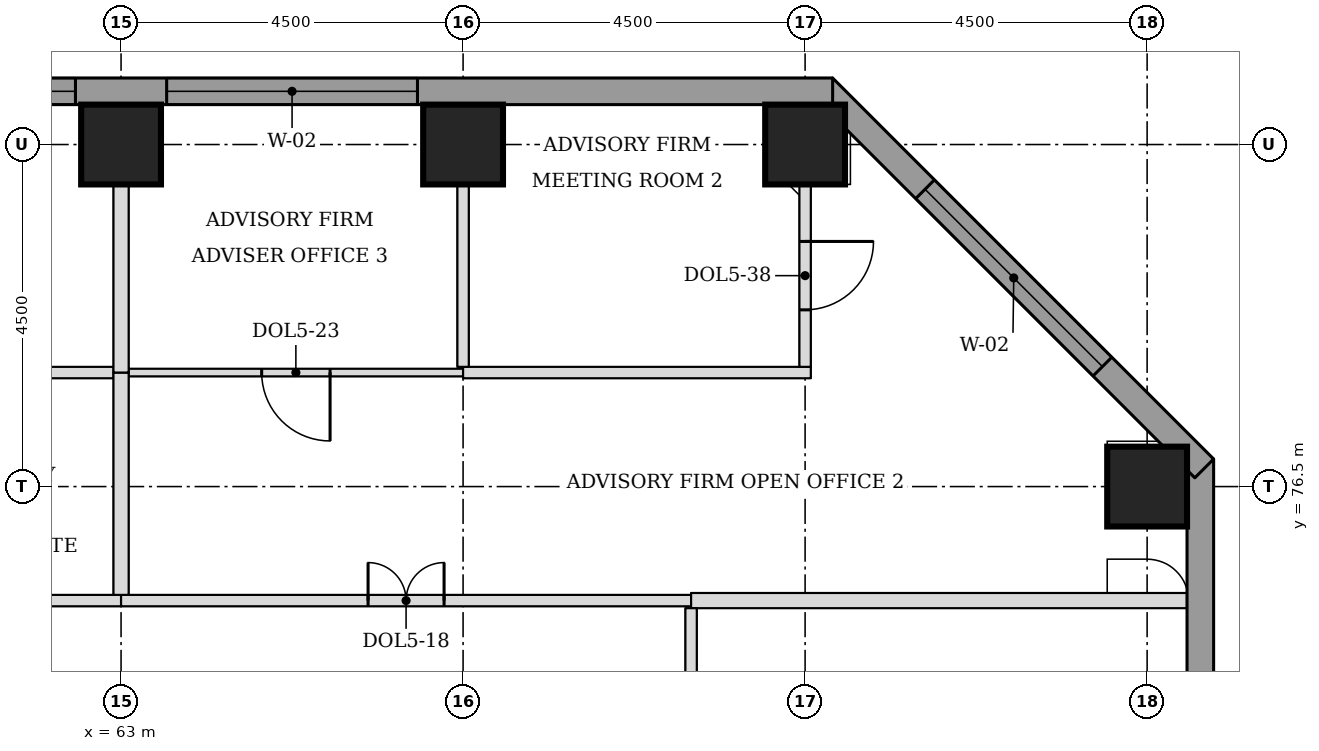
"""IFC4 building model, lengths in metres.
Left out: names, types, materials, properties, quantities, classifications, styles, units other than length and angle.
Written with IfcOpenShell. Run it as: python <this file> out.ifc"""

import sys

from ifc_helpers import new_model, si_unit, direction, frame, frame_2d, origin, origin_2d, place, context, subcontext, project, spatial, rectangle, extrude, element, fill, save


model = new_model("IFC4")
c1 = context("Model", 3, precision=1e-05, world=origin(), true_north=direction((0.0, 1.0)))
c2 = subcontext(c1, "Body", "Model", "MODEL_VIEW")
j1 = project(units=[si_unit("LENGTHUNIT", "METRE"), si_unit("PLANEANGLEUNIT", "RADIAN")], contexts=[c1])
p1 = place(None, origin())
s1 = spatial("IfcSite", under=j1, at=p1, CompositionType="ELEMENT")
p2 = place(p1, origin())
s2 = spatial("IfcBuilding", under=s1, at=p2, CompositionType="ELEMENT")
p3 = place(p2, frame((0.0, 0.0, 112.2)))
s3 = spatial("IfcBuildingStorey", under=s2, at=p3, CompositionType="ELEMENT", Elevation=112.2)
for number, where, z_axis, x_axis in (
    (1, (76.5, 76.5, 0.0), (0.0, 0.0, 1.0), (1.0, 0.0, 0.0)),
    (2, (63.0, 81.0, 0.0), (0.0, 0.0, 1.0), (1.0, 0.0, 0.0)),
    (3, (67.5, 81.0, 0.0), (0.0, 0.0, 1.0), (1.0, 0.0, 0.0)),
    (4, (72.0, 81.0, 0.0), (0.0, 0.0, 1.0), (1.0, 0.0, 0.0)),
):
    element("IfcColumn", number, at=place(p3, frame(where, z_axis=z_axis, x_axis=x_axis)), inside=s3, PredefinedType="COLUMN", context=c2, shape_type="SweptSolid", body=[
        extrude(rectangle(XDim=1.05, YDim=1.05, at=origin_2d()), origin(), (0.0, 0.0, 1.0), 3.7),
    ])
p4 = place(p3, frame((77.2, 44.638, 0.0), z_axis=(0.0, 0.0, 1.0), x_axis=(0.0, 1.0, 0.0)))
e5 = element("IfcWall", 5, at=p4, inside=s3, PredefinedType="STANDARD", context=c2, shape_type="SweptSolid", body=[
    extrude(rectangle(XDim=32.225, YDim=0.35, at=frame_2d((16.112, 0.0))), origin(), (0.0, 0.0, 1.0), 3.525),
])
p5 = place(p4, frame((5.462, 0.0, 0.9)))
e6 = element("IfcOpeningElement", 6, at=p5, cuts=e5, PredefinedType="OPENING", context=c2, shape_type="SweptSolid", body=[
    extrude(rectangle(XDim=3.3, YDim=1.9, at=frame_2d((1.65, 0.95))), frame((0.0, 0.185, 0.0), z_axis=(0.0, -1.0, 0.0), x_axis=(1.0, 0.0, 0.0)), (0.0, 0.0, 1.0), 0.37),
])
p6 = place(p4, frame((9.962, 0.0, 0.9)))
e7 = element("IfcOpeningElement", 7, at=p6, cuts=e5, PredefinedType="OPENING", context=c2, shape_type="SweptSolid", body=[
    extrude(rectangle(XDim=3.3, YDim=1.9, at=frame_2d((1.65, 0.95))), frame((0.0, 0.185, 0.0), z_axis=(0.0, -1.0, 0.0), x_axis=(1.0, 0.0, 0.0)), (0.0, 0.0, 1.0), 0.37),
])
p7 = place(p4, frame((14.462, 0.0, 0.9)))
e8 = element("IfcOpeningElement", 8, at=p7, cuts=e5, PredefinedType="OPENING", context=c2, shape_type="SweptSolid", body=[
    extrude(rectangle(XDim=3.3, YDim=1.9, at=frame_2d((1.65, 0.95))), frame((0.0, 0.185, 0.0), z_axis=(0.0, -1.0, 0.0), x_axis=(1.0, 0.0, 0.0)), (0.0, 0.0, 1.0), 0.37),
])
p8 = place(p4, frame((18.962, 0.0, 0.9)))
e9 = element("IfcOpeningElement", 9, at=p8, cuts=e5, PredefinedType="OPENING", context=c2, shape_type="SweptSolid", body=[
    extrude(rectangle(XDim=3.3, YDim=1.9, at=frame_2d((1.65, 0.95))), frame((0.0, 0.185, 0.0), z_axis=(0.0, -1.0, 0.0), x_axis=(1.0, 0.0, 0.0)), (0.0, 0.0, 1.0), 0.37),
])
p9 = place(p4, frame((23.462, 0.0, 0.9)))
e10 = element("IfcOpeningElement", 10, at=p9, cuts=e5, PredefinedType="OPENING", context=c2, shape_type="SweptSolid", body=[
    extrude(rectangle(XDim=3.3, YDim=1.9, at=frame_2d((1.65, 0.95))), frame((0.0, 0.185, 0.0), z_axis=(0.0, -1.0, 0.0), x_axis=(1.0, 0.0, 0.0)), (0.0, 0.0, 1.0), 0.37),
])
p10 = place(p3, frame((77.251, 76.739, 0.0), z_axis=(0.0, 0.0, 1.0), x_axis=(-0.707106781187, 0.707106781187, 0.0)))
e11 = element("IfcWall", 11, at=p10, inside=s3, PredefinedType="STANDARD", context=c2, shape_type="SweptSolid", body=[
    extrude(rectangle(XDim=7.089, YDim=0.35, at=frame_2d((3.544, 0.0))), origin(), (0.0, 0.0, 1.0), 3.525),
])
p11 = place(p10, frame((1.894, 0.0, 0.9)))
e12 = element("IfcOpeningElement", 12, at=p11, cuts=e11, PredefinedType="OPENING", context=c2, shape_type="SweptSolid", body=[
    extrude(rectangle(XDim=3.3, YDim=1.9, at=frame_2d((1.65, 0.95))), frame((0.0, 0.185, 0.0), z_axis=(0.0, -1.0, 0.0), x_axis=(1.0, 0.0, 0.0)), (0.0, 0.0, 1.0), 0.37),
])
p12 = place(p3, frame((72.362, 81.7, 0.0), z_axis=(0.0, 0.0, 1.0), x_axis=(-1.0, 0.0, 0.0)))
e13 = element("IfcWall", 13, at=p12, inside=s3, PredefinedType="STANDARD", context=c2, shape_type="SweptSolid", body=[
    extrude(rectangle(XDim=32.225, YDim=0.35, at=frame_2d((16.112, 0.0))), origin(), (0.0, 0.0, 1.0), 3.525),
])
p13 = place(p12, frame((5.462, 0.0, 0.9)))
e14 = element("IfcOpeningElement", 14, at=p13, cuts=e13, PredefinedType="OPENING", context=c2, shape_type="SweptSolid", body=[
    extrude(rectangle(XDim=3.3, YDim=1.9, at=frame_2d((1.65, 0.95))), frame((0.0, 0.185, 0.0), z_axis=(0.0, -1.0, 0.0), x_axis=(1.0, 0.0, 0.0)), (0.0, 0.0, 1.0), 0.37),
])
p14 = place(p12, frame((9.962, 0.0, 0.9)))
e15 = element("IfcOpeningElement", 15, at=p14, cuts=e13, PredefinedType="OPENING", context=c2, shape_type="SweptSolid", body=[
    extrude(rectangle(XDim=3.3, YDim=1.9, at=frame_2d((1.65, 0.95))), frame((0.0, 0.185, 0.0), z_axis=(0.0, -1.0, 0.0), x_axis=(1.0, 0.0, 0.0)), (0.0, 0.0, 1.0), 0.37),
])
p15 = place(p12, frame((14.462, 0.0, 0.9)))
e16 = element("IfcOpeningElement", 16, at=p15, cuts=e13, PredefinedType="OPENING", context=c2, shape_type="SweptSolid", body=[
    extrude(rectangle(XDim=3.3, YDim=1.9, at=frame_2d((1.65, 0.95))), frame((0.0, 0.185, 0.0), z_axis=(0.0, -1.0, 0.0), x_axis=(1.0, 0.0, 0.0)), (0.0, 0.0, 1.0), 0.37),
])
p16 = place(p12, frame((18.962, 0.0, 0.9)))
e17 = element("IfcOpeningElement", 17, at=p16, cuts=e13, PredefinedType="OPENING", context=c2, shape_type="SweptSolid", body=[
    extrude(rectangle(XDim=3.3, YDim=1.9, at=frame_2d((1.65, 0.95))), frame((0.0, 0.185, 0.0), z_axis=(0.0, -1.0, 0.0), x_axis=(1.0, 0.0, 0.0)), (0.0, 0.0, 1.0), 0.37),
])
p17 = place(p12, frame((23.462, 0.0, 0.9)))
e18 = element("IfcOpeningElement", 18, at=p17, cuts=e13, PredefinedType="OPENING", context=c2, shape_type="SweptSolid", body=[
    extrude(rectangle(XDim=3.3, YDim=1.9, at=frame_2d((1.65, 0.95))), frame((0.0, 0.185, 0.0), z_axis=(0.0, -1.0, 0.0), x_axis=(1.0, 0.0, 0.0)), (0.0, 0.0, 1.0), 0.37),
])
p18 = place(p3, frame((60.0, 75.0, 0.0), z_axis=(0.0, 0.0, 1.0), x_axis=(1.0, 0.0, 0.0)))
e19 = element("IfcWall", 19, at=p18, inside=s3, PredefinedType="PARTITIONING", context=c2, shape_type="SweptSolid", body=[
    extrude(rectangle(XDim=3.0, YDim=0.15, at=frame_2d((1.5, 0.0))), origin(), (0.0, 0.0, 1.0), 3.55),
])
p19 = place(p3, frame((63.0, 75.0, 0.0), z_axis=(0.0, 0.0, 1.0), x_axis=(1.0, 0.0, 0.0)))
e20 = element("IfcWall", 20, at=p19, inside=s3, PredefinedType="PARTITIONING", context=c2, shape_type="SweptSolid", body=[
    extrude(rectangle(XDim=7.5, YDim=0.15, at=frame_2d((3.75, 0.0))), origin(), (0.0, 0.0, 1.0), 3.55),
])
p20 = place(p19, frame((3.25, 0.0, 0.0)))
e21 = element("IfcOpeningElement", 21, at=p20, cuts=e20, PredefinedType="OPENING", context=c2, shape_type="SweptSolid", body=[
    extrude(rectangle(XDim=1.0, YDim=2.1, at=frame_2d((0.5, 1.05))), frame((0.0, 0.085, 0.0), z_axis=(0.0, -1.0, 0.0), x_axis=(1.0, 0.0, 0.0)), (0.0, 0.0, 1.0), 0.17),
])
p21 = place(p3, frame((70.5, 75.0, 0.0), z_axis=(0.0, 0.0, 1.0), x_axis=(1.0, 0.0, 0.0)))
e22 = element("IfcWall", 22, at=p21, inside=s3, PredefinedType="PARTITIONING", context=c2, shape_type="SweptSolid", body=[
    extrude(rectangle(XDim=6.525, YDim=0.2, at=frame_2d((3.262, 0.0))), origin(), (0.0, 0.0, 1.0), 3.55),
])
p22 = place(p3, frame((59.925, 78.0, 0.0), z_axis=(0.0, 0.0, 1.0), x_axis=(1.0, 0.0, 0.0)))
e23 = element("IfcWall", 23, at=p22, inside=s3, PredefinedType="PARTITIONING", context=c2, shape_type="SweptSolid", body=[
    extrude(rectangle(XDim=2.975, YDim=0.15, at=frame_2d((1.487, 0.0))), origin(), (0.0, 0.0, 1.0), 3.55),
])
p23 = place(p22, frame((1.05, 0.0, 0.0)))
e24 = element("IfcOpeningElement", 24, at=p23, cuts=e23, PredefinedType="OPENING", context=c2, shape_type="SweptSolid", body=[
    extrude(rectangle(XDim=0.9, YDim=2.1, at=frame_2d((0.45, 1.05))), frame((0.0, 0.085, 0.0), z_axis=(0.0, -1.0, 0.0), x_axis=(1.0, 0.0, 0.0)), (0.0, 0.0, 1.0), 0.17),
])
p24 = place(p3, frame((63.1, 78.0, 0.0), z_axis=(0.0, 0.0, 1.0), x_axis=(1.0, 0.0, 0.0)))
e25 = element("IfcWall", 25, at=p24, inside=s3, PredefinedType="PARTITIONING", context=c2, shape_type="SweptSolid", body=[
    extrude(rectangle(XDim=4.4, YDim=0.1, at=frame_2d((2.2, 0.0))), origin(), (0.0, 0.0, 1.0), 3.55),
])
p25 = place(p24, frame((1.75, 0.0, 0.0)))
e26 = element("IfcOpeningElement", 26, at=p25, cuts=e25, PredefinedType="OPENING", context=c2, shape_type="SweptSolid", body=[
    extrude(rectangle(XDim=0.9, YDim=2.1, at=frame_2d((0.45, 1.05))), frame((0.0, 0.06, 0.0), z_axis=(0.0, -1.0, 0.0), x_axis=(1.0, 0.0, 0.0)), (0.0, 0.0, 1.0), 0.12),
])
p26 = place(p3, frame((67.5, 78.0, 0.0), z_axis=(0.0, 0.0, 1.0), x_axis=(1.0, 0.0, 0.0)))
e27 = element("IfcWall", 27, at=p26, inside=s3, PredefinedType="PARTITIONING", context=c2, shape_type="SweptSolid", body=[
    extrude(rectangle(XDim=4.575, YDim=0.15, at=frame_2d((2.288, 0.0))), origin(), (0.0, 0.0, 1.0), 3.55),
])
p27 = place(p3, frame((70.5, 57.0, 0.0), z_axis=(0.0, 0.0, 1.0), x_axis=(0.0, 1.0, 0.0)))
e28 = element("IfcWall", 28, at=p27, inside=s3, PredefinedType="PARTITIONING", context=c2, shape_type="SweptSolid", body=[
    extrude(rectangle(XDim=17.9, YDim=0.15, at=frame_2d((8.95, 0.0))), origin(), (0.0, 0.0, 1.0), 3.55),
])
p28 = place(p27, frame((8.45, 0.0, 0.0)))
e29 = element("IfcOpeningElement", 29, at=p28, cuts=e28, PredefinedType="OPENING", context=c2, shape_type="SweptSolid", body=[
    extrude(rectangle(XDim=1.0, YDim=2.1, at=frame_2d((0.5, 1.05))), frame((0.0, 0.085, 0.0), z_axis=(0.0, -1.0, 0.0), x_axis=(1.0, 0.0, 0.0)), (0.0, 0.0, 1.0), 0.17),
])
p29 = place(p3, frame((63.0, 75.075, 0.0), z_axis=(0.0, 0.0, 1.0), x_axis=(0.0, 1.0, 0.0)))
e30 = element("IfcWall", 30, at=p29, inside=s3, PredefinedType="PARTITIONING", context=c2, shape_type="SweptSolid", body=[
    extrude(rectangle(XDim=2.925, YDim=0.2, at=frame_2d((1.462, 0.0))), origin(), (0.0, 0.0, 1.0), 3.55),
])
p30 = place(p3, frame((63.0, 78.0, 0.0), z_axis=(0.0, 0.0, 1.0), x_axis=(0.0, 1.0, 0.0)))
e31 = element("IfcWall", 31, at=p30, inside=s3, PredefinedType="PARTITIONING", context=c2, shape_type="SweptSolid", body=[
    extrude(rectangle(XDim=3.525, YDim=0.2, at=frame_2d((1.762, 0.0))), origin(), (0.0, 0.0, 1.0), 3.55),
])
p31 = place(p3, frame((67.5, 78.075, 0.0), z_axis=(0.0, 0.0, 1.0), x_axis=(0.0, 1.0, 0.0)))
e32 = element("IfcWall", 32, at=p31, inside=s3, PredefinedType="PARTITIONING", context=c2, shape_type="SweptSolid", body=[
    extrude(rectangle(XDim=3.45, YDim=0.15, at=frame_2d((1.725, 0.0))), origin(), (0.0, 0.0, 1.0), 3.55),
])
p32 = place(p3, frame((72.0, 78.075, 0.0), z_axis=(0.0, 0.0, 1.0), x_axis=(0.0, 1.0, 0.0)))
e33 = element("IfcWall", 33, at=p32, inside=s3, PredefinedType="PARTITIONING", context=c2, shape_type="SweptSolid", body=[
    extrude(rectangle(XDim=2.4, YDim=0.15, at=frame_2d((1.2, 0.0))), origin(), (0.0, 0.0, 1.0), 3.55),
])
p33 = place(p32, frame((0.75, 0.0, 0.0)))
e34 = element("IfcOpeningElement", 34, at=p33, cuts=e33, PredefinedType="OPENING", context=c2, shape_type="SweptSolid", body=[
    extrude(rectangle(XDim=0.9, YDim=2.1, at=frame_2d((0.45, 1.05))), frame((0.0, 0.085, 0.0), z_axis=(0.0, -1.0, 0.0), x_axis=(1.0, 0.0, 0.0)), (0.0, 0.0, 1.0), 0.17),
])
p34 = place(p11, origin())
e35 = element("IfcWindow", 35, at=p34, inside=s3, PartitioningType="SINGLE_PANEL", PredefinedType="WINDOW", context=c2, shape_type="SweptSolid", body=[
    extrude(rectangle(XDim=3.3, YDim=1.9, at=frame_2d((1.65, 0.95))), frame((0.0, 0.085, 0.0), z_axis=(0.0, -1.0, 0.0), x_axis=(1.0, 0.0, 0.0)), (0.0, 0.0, 1.0), 0.06),
])
fill(e12, e35)
p35 = place(p13, origin())
e36 = element("IfcWindow", 36, at=p35, inside=s3, PartitioningType="SINGLE_PANEL", PredefinedType="WINDOW", context=c2, shape_type="SweptSolid", body=[
    extrude(rectangle(XDim=3.3, YDim=1.9, at=frame_2d((1.65, 0.95))), frame((0.0, 0.085, 0.0), z_axis=(0.0, -1.0, 0.0), x_axis=(1.0, 0.0, 0.0)), (0.0, 0.0, 1.0), 0.06),
])
fill(e14, e36)
p36 = place(p14, origin())
e37 = element("IfcWindow", 37, at=p36, inside=s3, PartitioningType="SINGLE_PANEL", PredefinedType="WINDOW", context=c2, shape_type="SweptSolid", body=[
    extrude(rectangle(XDim=3.3, YDim=1.9, at=frame_2d((1.65, 0.95))), frame((0.0, 0.085, 0.0), z_axis=(0.0, -1.0, 0.0), x_axis=(1.0, 0.0, 0.0)), (0.0, 0.0, 1.0), 0.06),
])
fill(e15, e37)
p37 = place(p20, origin())
e38 = element("IfcDoor", 38, at=p37, inside=s3, OperationType="DOUBLE_DOOR_SINGLE_SWING", PredefinedType="DOOR", context=c2, shape_type="SweptSolid", body=[
    extrude(rectangle(XDim=1.0, YDim=2.1, at=frame_2d((0.5, 1.05))), frame((0.0, 0.025, 0.0), z_axis=(0.0, -1.0, 0.0), x_axis=(1.0, 0.0, 0.0)), (0.0, 0.0, 1.0), 0.05),
])
fill(e21, e38)
p38 = place(p25, frame((0.9, 0.0, 0.0), z_axis=(0.0, 0.0, 1.0), x_axis=(-1.0, 0.0, 0.0)))
e39 = element("IfcDoor", 39, at=p38, inside=s3, OperationType="SINGLE_SWING_LEFT", PredefinedType="DOOR", context=c2, shape_type="SweptSolid", body=[
    extrude(rectangle(XDim=0.9, YDim=2.1, at=frame_2d((0.45, 1.05))), frame((0.0, 0.025, 0.0), z_axis=(0.0, -1.0, 0.0), x_axis=(1.0, 0.0, 0.0)), (0.0, 0.0, 1.0), 0.05),
])
fill(e26, e39)
p39 = place(p33, frame((0.9, 0.0, 0.0), z_axis=(0.0, 0.0, 1.0), x_axis=(-1.0, 0.0, 0.0)))
e40 = element("IfcDoor", 40, at=p39, inside=s3, OperationType="SINGLE_SWING_LEFT", PredefinedType="DOOR", context=c2, shape_type="SweptSolid", body=[
    extrude(rectangle(XDim=0.9, YDim=2.1, at=frame_2d((0.45, 1.05))), frame((0.0, 0.025, 0.0), z_axis=(0.0, -1.0, 0.0), x_axis=(1.0, 0.0, 0.0)), (0.0, 0.0, 1.0), 0.05),
])
fill(e34, e40)
save(model, sys.argv[1])
